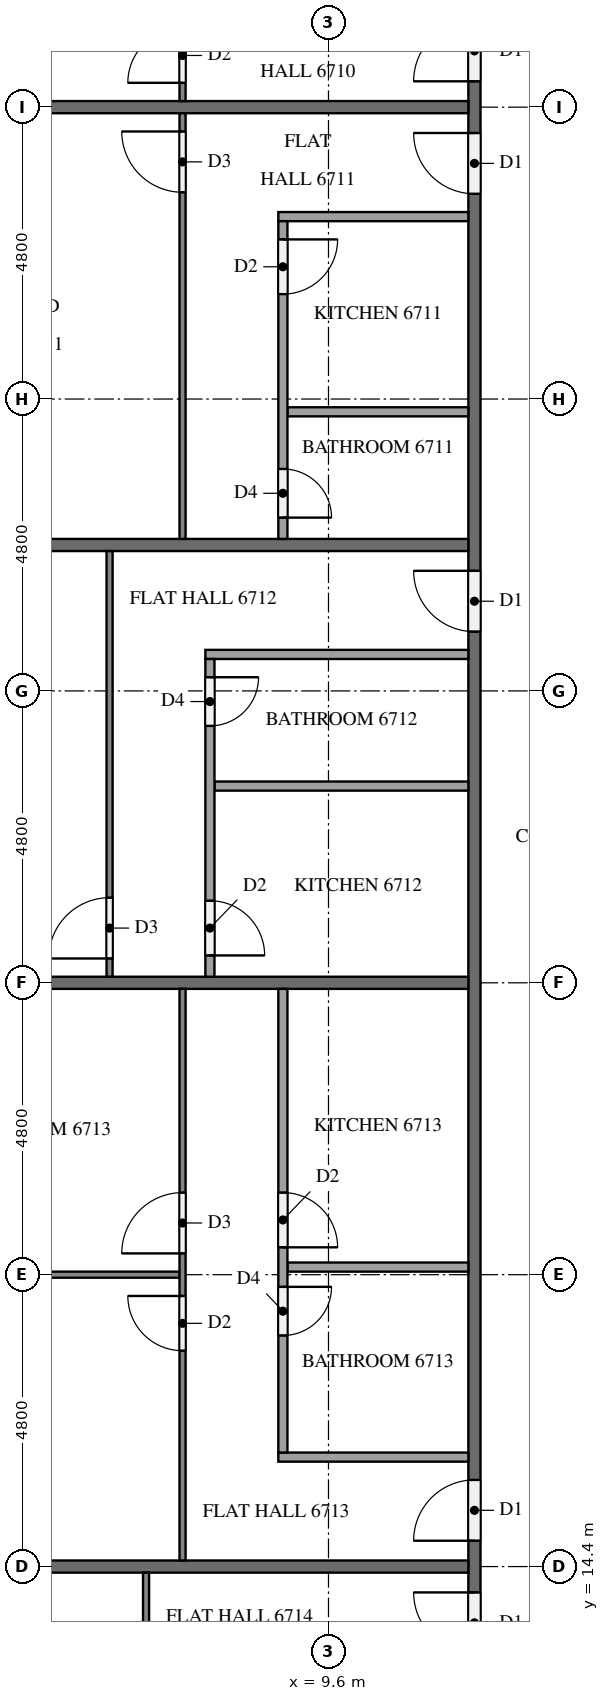
"""IFC4 building model, lengths in metres.
Left out: names, types, materials, properties, quantities, classifications, styles, units other than length and angle.
Written with IfcOpenShell. Run it as: python <this file> out.ifc"""

import sys

from ifc_helpers import new_model, si_unit, direction, frame, frame_2d, origin, place, context, subcontext, project, spatial, rectangle, extrude, element, fill, save


model = new_model("IFC4")
c1 = context("Model", 3, precision=1e-05, world=origin(), true_north=direction((0.0, 1.0)))
c2 = subcontext(c1, "Body", "Model", "MODEL_VIEW")
j1 = project(units=[si_unit("LENGTHUNIT", "METRE"), si_unit("PLANEANGLEUNIT", "RADIAN")], contexts=[c1])
p1 = place(None, origin())
s1 = spatial("IfcSite", under=j1, at=p1, CompositionType="ELEMENT")
p2 = place(p1, origin())
s2 = spatial("IfcBuilding", under=s1, at=p2, CompositionType="ELEMENT")
p3 = place(p2, frame((0.0, 0.0, 256.2)))
s3 = spatial("IfcBuildingStorey", under=s2, at=p3, CompositionType="ELEMENT", Elevation=256.2)
p4 = place(p3, frame((12.0, 12.1, 0.0), z_axis=(0.0, 0.0, 1.0), x_axis=(0.0, 1.0, 0.0)))
e1 = element("IfcWall", 1, at=p4, inside=s3, PredefinedType="PARTITIONING", context=c2, shape_type="SweptSolid", body=[
    extrude(rectangle(XDim=28.6, YDim=0.2, at=frame_2d((14.3, 0.0))), origin(), (0.0, 0.0, 1.0), 3.2),
])
p5 = place(p4, frame((26.725, 0.0, 0.0)))
e2 = element("IfcOpeningElement", 2, at=p5, cuts=e1, PredefinedType="OPENING", context=c2, shape_type="SweptSolid", body=[
    extrude(rectangle(XDim=1.0, YDim=2.1, at=frame_2d((0.5, 1.05))), frame((0.0, 0.11, 0.0), z_axis=(0.0, -1.0, 0.0), x_axis=(1.0, 0.0, 0.0)), (0.0, 0.0, 1.0), 0.22),
])
p6 = place(p4, frame((24.875, 0.0, 0.0)))
e3 = element("IfcOpeningElement", 3, at=p6, cuts=e1, PredefinedType="OPENING", context=c2, shape_type="SweptSolid", body=[
    extrude(rectangle(XDim=1.0, YDim=2.1, at=frame_2d((0.5, 1.05))), frame((0.0, 0.11, 0.0), z_axis=(0.0, -1.0, 0.0), x_axis=(1.0, 0.0, 0.0)), (0.0, 0.0, 1.0), 0.22),
])
p7 = place(p4, frame((17.675, 0.0, 0.0)))
e4 = element("IfcOpeningElement", 4, at=p7, cuts=e1, PredefinedType="OPENING", context=c2, shape_type="SweptSolid", body=[
    extrude(rectangle(XDim=1.0, YDim=2.1, at=frame_2d((0.5, 1.05))), frame((0.0, 0.11, 0.0), z_axis=(0.0, -1.0, 0.0), x_axis=(1.0, 0.0, 0.0)), (0.0, 0.0, 1.0), 0.22),
])
p8 = place(p4, frame((2.725, 0.0, 0.0)))
e5 = element("IfcOpeningElement", 5, at=p8, cuts=e1, PredefinedType="OPENING", context=c2, shape_type="SweptSolid", body=[
    extrude(rectangle(XDim=1.0, YDim=2.1, at=frame_2d((0.5, 1.05))), frame((0.0, 0.11, 0.0), z_axis=(0.0, -1.0, 0.0), x_axis=(1.0, 0.0, 0.0)), (0.0, 0.0, 1.0), 0.22),
])
p9 = place(p4, frame((0.875, 0.0, 0.0)))
e6 = element("IfcOpeningElement", 6, at=p9, cuts=e1, PredefinedType="OPENING", context=c2, shape_type="SweptSolid", body=[
    extrude(rectangle(XDim=1.0, YDim=2.1, at=frame_2d((0.5, 1.05))), frame((0.0, 0.11, 0.0), z_axis=(0.0, -1.0, 0.0), x_axis=(1.0, 0.0, 0.0)), (0.0, 0.0, 1.0), 0.22),
])
p10 = place(p3, frame((0.275, 38.4, 0.0), z_axis=(0.0, 0.0, 1.0), x_axis=(1.0, 0.0, 0.0)))
e7 = element("IfcWall", 7, at=p10, inside=s3, PredefinedType="PARTITIONING", context=c2, shape_type="SweptSolid", body=[
    extrude(rectangle(XDim=11.625, YDim=0.2, at=frame_2d((5.812, 0.0))), origin(), (0.0, 0.0, 1.0), 3.2),
])
for number, where, z_axis, x_axis in (
    (8, (0.1, 31.2, 0.0), (0.0, 0.0, 1.0), (1.0, 0.0, 0.0)),
    (9, (0.1, 24.0, 0.0), (0.0, 0.0, 1.0), (1.0, 0.0, 0.0)),
    (10, (0.1, 14.4, 0.0), (0.0, 0.0, 1.0), (1.0, 0.0, 0.0)),
):
    element("IfcWall", number, at=place(p3, frame(where, z_axis=z_axis, x_axis=x_axis)), inside=s3, PredefinedType="PARTITIONING", context=c2, shape_type="SweptSolid", body=[
        extrude(rectangle(XDim=11.8, YDim=0.2, at=frame_2d((5.9, 0.0))), origin(), (0.0, 0.0, 1.0), 3.2),
    ])
p11 = place(p3, frame((7.2, 38.5, 0.0), z_axis=(0.0, 0.0, 1.0), x_axis=(0.0, 1.0, 0.0)))
e11 = element("IfcWall", 11, at=p11, inside=s3, PredefinedType="PARTITIONING", context=c2, shape_type="SweptSolid", body=[
    extrude(rectangle(XDim=14.2, YDim=0.1, at=frame_2d((7.1, 0.0))), origin(), (0.0, 0.0, 1.0), 3.2),
])
p12 = place(p11, frame((0.3, 0.0, 0.0)))
e12 = element("IfcOpeningElement", 12, at=p12, cuts=e11, PredefinedType="OPENING", context=c2, shape_type="SweptSolid", body=[
    extrude(rectangle(XDim=0.9, YDim=2.1, at=frame_2d((0.45, 1.05))), frame((0.0, 0.06, 0.0), z_axis=(0.0, -1.0, 0.0), x_axis=(1.0, 0.0, 0.0)), (0.0, 0.0, 1.0), 0.12),
])
p13 = place(p11, frame((8.25, 0.0, 0.0)))
e13 = element("IfcOpeningElement", 13, at=p13, cuts=e11, PredefinedType="OPENING", context=c2, shape_type="SweptSolid", body=[
    extrude(rectangle(XDim=0.9, YDim=2.1, at=frame_2d((0.45, 1.05))), frame((0.0, 0.06, 0.0), z_axis=(0.0, -1.0, 0.0), x_axis=(1.0, 0.0, 0.0)), (0.0, 0.0, 1.0), 0.12),
])
p14 = place(p11, frame((9.85, 0.0, 0.0)))
e14 = element("IfcOpeningElement", 14, at=p14, cuts=e11, PredefinedType="OPENING", context=c2, shape_type="SweptSolid", body=[
    extrude(rectangle(XDim=1.0, YDim=2.1, at=frame_2d((0.5, 1.05))), frame((0.0, 0.06, 0.0), z_axis=(0.0, -1.0, 0.0), x_axis=(1.0, 0.0, 0.0)), (0.0, 0.0, 1.0), 0.12),
])
p15 = place(p3, frame((7.2, 31.3, 0.0), z_axis=(0.0, 0.0, 1.0), x_axis=(0.0, 1.0, 0.0)))
e15 = element("IfcWall", 15, at=p15, inside=s3, PredefinedType="PARTITIONING", context=c2, shape_type="SweptSolid", body=[
    extrude(rectangle(XDim=7.0, YDim=0.1, at=frame_2d((3.5, 0.0))), origin(), (0.0, 0.0, 1.0), 3.2),
])
p16 = place(p15, frame((5.7, 0.0, 0.0)))
e16 = element("IfcOpeningElement", 16, at=p16, cuts=e15, PredefinedType="OPENING", context=c2, shape_type="SweptSolid", body=[
    extrude(rectangle(XDim=1.0, YDim=2.1, at=frame_2d((0.5, 1.05))), frame((0.0, 0.06, 0.0), z_axis=(0.0, -1.0, 0.0), x_axis=(1.0, 0.0, 0.0)), (0.0, 0.0, 1.0), 0.12),
])
p17 = place(p3, frame((11.9, 33.39, 0.0), z_axis=(0.0, 0.0, 1.0), x_axis=(-1.0, 0.0, 0.0)))
e17 = element("IfcWall", 17, at=p17, inside=s3, PredefinedType="PARTITIONING", context=c2, shape_type="SweptSolid", body=[
    extrude(rectangle(XDim=2.975, YDim=0.15, at=frame_2d((1.487, 0.0))), origin(), (0.0, 0.0, 1.0), 3.2),
])
p18 = place(p3, frame((11.9, 36.6, 0.0), z_axis=(0.0, 0.0, 1.0), x_axis=(-1.0, 0.0, 0.0)))
e18 = element("IfcWall", 18, at=p18, inside=s3, PredefinedType="PARTITIONING", context=c2, shape_type="SweptSolid", body=[
    extrude(rectangle(XDim=3.125, YDim=0.15, at=frame_2d((1.562, 0.0))), origin(), (0.0, 0.0, 1.0), 3.2),
])
p19 = place(p3, frame((8.85, 36.525, 0.0), z_axis=(0.0, 0.0, 1.0), x_axis=(0.0, -1.0, 0.0)))
e19 = element("IfcWall", 19, at=p19, inside=s3, PredefinedType="PARTITIONING", context=c2, shape_type="SweptSolid", body=[
    extrude(rectangle(XDim=5.225, YDim=0.15, at=frame_2d((2.612, 0.0))), origin(), (0.0, 0.0, 1.0), 3.2),
])
p20 = place(p19, frame((0.3, 0.0, 0.0)))
e20 = element("IfcOpeningElement", 20, at=p20, cuts=e19, PredefinedType="OPENING", context=c2, shape_type="SweptSolid", body=[
    extrude(rectangle(XDim=0.9, YDim=2.1, at=frame_2d((0.45, 1.05))), frame((0.0, 0.085, 0.0), z_axis=(0.0, -1.0, 0.0), x_axis=(1.0, 0.0, 0.0)), (0.0, 0.0, 1.0), 0.17),
])
p21 = place(p19, frame((4.075, 0.0, 0.0)))
e21 = element("IfcOpeningElement", 21, at=p21, cuts=e19, PredefinedType="OPENING", context=c2, shape_type="SweptSolid", body=[
    extrude(rectangle(XDim=0.8, YDim=2.1, at=frame_2d((0.4, 1.05))), frame((0.0, 0.085, 0.0), z_axis=(0.0, -1.0, 0.0), x_axis=(1.0, 0.0, 0.0)), (0.0, 0.0, 1.0), 0.17),
])
p22 = place(p3, frame((6.0, 24.1, 0.0), z_axis=(0.0, 0.0, 1.0), x_axis=(0.0, 1.0, 0.0)))
e22 = element("IfcWall", 22, at=p22, inside=s3, PredefinedType="PARTITIONING", context=c2, shape_type="SweptSolid", body=[
    extrude(rectangle(XDim=7.0, YDim=0.1, at=frame_2d((3.5, 0.0))), origin(), (0.0, 0.0, 1.0), 3.2),
])
p23 = place(p22, frame((0.3, 0.0, 0.0)))
e23 = element("IfcOpeningElement", 23, at=p23, cuts=e22, PredefinedType="OPENING", context=c2, shape_type="SweptSolid", body=[
    extrude(rectangle(XDim=1.0, YDim=2.1, at=frame_2d((0.5, 1.05))), frame((0.0, 0.06, 0.0), z_axis=(0.0, -1.0, 0.0), x_axis=(1.0, 0.0, 0.0)), (0.0, 0.0, 1.0), 0.12),
])
p24 = place(p3, frame((11.9, 27.235, 0.0), z_axis=(0.0, 0.0, 1.0), x_axis=(-1.0, 0.0, 0.0)))
e24 = element("IfcWall", 24, at=p24, inside=s3, PredefinedType="PARTITIONING", context=c2, shape_type="SweptSolid", body=[
    extrude(rectangle(XDim=4.175, YDim=0.15, at=frame_2d((2.087, 0.0))), origin(), (0.0, 0.0, 1.0), 3.2),
])
p25 = place(p3, frame((11.9, 29.4, 0.0), z_axis=(0.0, 0.0, 1.0), x_axis=(-1.0, 0.0, 0.0)))
e25 = element("IfcWall", 25, at=p25, inside=s3, PredefinedType="PARTITIONING", context=c2, shape_type="SweptSolid", body=[
    extrude(rectangle(XDim=4.325, YDim=0.15, at=frame_2d((2.163, 0.0))), origin(), (0.0, 0.0, 1.0), 3.2),
])
p26 = place(p3, frame((7.65, 29.325, 0.0), z_axis=(0.0, 0.0, 1.0), x_axis=(0.0, -1.0, 0.0)))
e26 = element("IfcWall", 26, at=p26, inside=s3, PredefinedType="PARTITIONING", context=c2, shape_type="SweptSolid", body=[
    extrude(rectangle(XDim=5.225, YDim=0.15, at=frame_2d((2.612, 0.0))), origin(), (0.0, 0.0, 1.0), 3.2),
])
p27 = place(p26, frame((0.3, 0.0, 0.0)))
e27 = element("IfcOpeningElement", 27, at=p27, cuts=e26, PredefinedType="OPENING", context=c2, shape_type="SweptSolid", body=[
    extrude(rectangle(XDim=0.8, YDim=2.1, at=frame_2d((0.4, 1.05))), frame((0.0, 0.085, 0.0), z_axis=(0.0, -1.0, 0.0), x_axis=(1.0, 0.0, 0.0)), (0.0, 0.0, 1.0), 0.17),
])
p28 = place(p26, frame((3.975, 0.0, 0.0)))
e28 = element("IfcOpeningElement", 28, at=p28, cuts=e26, PredefinedType="OPENING", context=c2, shape_type="SweptSolid", body=[
    extrude(rectangle(XDim=0.9, YDim=2.1, at=frame_2d((0.45, 1.05))), frame((0.0, 0.085, 0.0), z_axis=(0.0, -1.0, 0.0), x_axis=(1.0, 0.0, 0.0)), (0.0, 0.0, 1.0), 0.17),
])
p29 = place(p3, frame((7.15, 19.2, 0.0), z_axis=(0.0, 0.0, 1.0), x_axis=(-1.0, 0.0, 0.0)))
e29 = element("IfcWall", 29, at=p29, inside=s3, PredefinedType="PARTITIONING", context=c2, shape_type="SweptSolid", body=[
    extrude(rectangle(XDim=6.875, YDim=0.1, at=frame_2d((3.438, 0.0))), origin(), (0.0, 0.0, 1.0), 3.2),
])
p30 = place(p3, frame((7.2, 14.5, 0.0), z_axis=(0.0, 0.0, 1.0), x_axis=(0.0, 1.0, 0.0)))
e30 = element("IfcWall", 30, at=p30, inside=s3, PredefinedType="PARTITIONING", context=c2, shape_type="SweptSolid", body=[
    extrude(rectangle(XDim=9.4, YDim=0.1, at=frame_2d((4.7, 0.0))), origin(), (0.0, 0.0, 1.0), 3.2),
])
p31 = place(p30, frame((3.45, 0.0, 0.0)))
e31 = element("IfcOpeningElement", 31, at=p31, cuts=e30, PredefinedType="OPENING", context=c2, shape_type="SweptSolid", body=[
    extrude(rectangle(XDim=0.9, YDim=2.1, at=frame_2d((0.45, 1.05))), frame((0.0, 0.06, 0.0), z_axis=(0.0, -1.0, 0.0), x_axis=(1.0, 0.0, 0.0)), (0.0, 0.0, 1.0), 0.12),
])
p32 = place(p30, frame((5.05, 0.0, 0.0)))
e32 = element("IfcOpeningElement", 32, at=p32, cuts=e30, PredefinedType="OPENING", context=c2, shape_type="SweptSolid", body=[
    extrude(rectangle(XDim=1.0, YDim=2.1, at=frame_2d((0.5, 1.05))), frame((0.0, 0.06, 0.0), z_axis=(0.0, -1.0, 0.0), x_axis=(1.0, 0.0, 0.0)), (0.0, 0.0, 1.0), 0.12),
])
p33 = place(p3, frame((11.9, 19.325, 0.0), z_axis=(0.0, 0.0, 1.0), x_axis=(-1.0, 0.0, 0.0)))
e33 = element("IfcWall", 33, at=p33, inside=s3, PredefinedType="PARTITIONING", context=c2, shape_type="SweptSolid", body=[
    extrude(rectangle(XDim=2.975, YDim=0.15, at=frame_2d((1.487, 0.0))), origin(), (0.0, 0.0, 1.0), 3.2),
])
p34 = place(p3, frame((11.9, 16.2, 0.0), z_axis=(0.0, 0.0, 1.0), x_axis=(-1.0, 0.0, 0.0)))
e34 = element("IfcWall", 34, at=p34, inside=s3, PredefinedType="PARTITIONING", context=c2, shape_type="SweptSolid", body=[
    extrude(rectangle(XDim=3.125, YDim=0.15, at=frame_2d((1.562, 0.0))), origin(), (0.0, 0.0, 1.0), 3.2),
])
p35 = place(p3, frame((8.85, 23.9, 0.0), z_axis=(0.0, 0.0, 1.0), x_axis=(0.0, -1.0, 0.0)))
e35 = element("IfcWall", 35, at=p35, inside=s3, PredefinedType="PARTITIONING", context=c2, shape_type="SweptSolid", body=[
    extrude(rectangle(XDim=7.625, YDim=0.15, at=frame_2d((3.812, 0.0))), origin(), (0.0, 0.0, 1.0), 3.2),
])
p36 = place(p35, frame((4.9, 0.0, 0.0)))
e36 = element("IfcOpeningElement", 36, at=p36, cuts=e35, PredefinedType="OPENING", context=c2, shape_type="SweptSolid", body=[
    extrude(rectangle(XDim=0.8, YDim=2.1, at=frame_2d((0.4, 1.05))), frame((0.0, 0.085, 0.0), z_axis=(0.0, -1.0, 0.0), x_axis=(1.0, 0.0, 0.0)), (0.0, 0.0, 1.0), 0.17),
])
p37 = place(p35, frame((3.35, 0.0, 0.0)))
e37 = element("IfcOpeningElement", 37, at=p37, cuts=e35, PredefinedType="OPENING", context=c2, shape_type="SweptSolid", body=[
    extrude(rectangle(XDim=0.9, YDim=2.1, at=frame_2d((0.45, 1.05))), frame((0.0, 0.085, 0.0), z_axis=(0.0, -1.0, 0.0), x_axis=(1.0, 0.0, 0.0)), (0.0, 0.0, 1.0), 0.17),
])
p38 = place(p3, frame((6.6, 4.9, 0.0), z_axis=(0.0, 0.0, 1.0), x_axis=(0.0, 1.0, 0.0)))
e38 = element("IfcWall", 38, at=p38, inside=s3, PredefinedType="PARTITIONING", context=c2, shape_type="SweptSolid", body=[
    extrude(rectangle(XDim=9.4, YDim=0.1, at=frame_2d((4.7, 0.0))), origin(), (0.0, 0.0, 1.0), 3.2),
])
p39 = place(p38, frame((5.05, 0.0, 0.0)))
e39 = element("IfcOpeningElement", 39, at=p39, cuts=e38, PredefinedType="OPENING", context=c2, shape_type="SweptSolid", body=[
    extrude(rectangle(XDim=0.9, YDim=2.1, at=frame_2d((0.45, 1.05))), frame((0.0, 0.06, 0.0), z_axis=(0.0, -1.0, 0.0), x_axis=(1.0, 0.0, 0.0)), (0.0, 0.0, 1.0), 0.12),
])
p40 = place(p38, frame((3.35, 0.0, 0.0)))
e40 = element("IfcOpeningElement", 40, at=p40, cuts=e38, PredefinedType="OPENING", context=c2, shape_type="SweptSolid", body=[
    extrude(rectangle(XDim=1.0, YDim=2.1, at=frame_2d((0.5, 1.05))), frame((0.0, 0.06, 0.0), z_axis=(0.0, -1.0, 0.0), x_axis=(1.0, 0.0, 0.0)), (0.0, 0.0, 1.0), 0.12),
])
p41 = place(p5, origin())
e41 = element("IfcDoor", 41, at=p41, inside=s3, OperationType="SINGLE_SWING_LEFT", PredefinedType="DOOR", context=c2, shape_type="SweptSolid", body=[
    extrude(rectangle(XDim=1.0, YDim=2.1, at=frame_2d((0.5, 1.05))), frame((0.0, 0.025, 0.0), z_axis=(0.0, -1.0, 0.0), x_axis=(1.0, 0.0, 0.0)), (0.0, 0.0, 1.0), 0.05),
])
fill(e2, e41)
p42 = place(p6, origin())
e42 = element("IfcDoor", 42, at=p42, inside=s3, OperationType="SINGLE_SWING_RIGHT", PredefinedType="DOOR", context=c2, shape_type="SweptSolid", body=[
    extrude(rectangle(XDim=1.0, YDim=2.1, at=frame_2d((0.5, 1.05))), frame((0.0, 0.025, 0.0), z_axis=(0.0, -1.0, 0.0), x_axis=(1.0, 0.0, 0.0)), (0.0, 0.0, 1.0), 0.05),
])
fill(e3, e42)
p43 = place(p7, origin())
e43 = element("IfcDoor", 43, at=p43, inside=s3, OperationType="SINGLE_SWING_RIGHT", PredefinedType="DOOR", context=c2, shape_type="SweptSolid", body=[
    extrude(rectangle(XDim=1.0, YDim=2.1, at=frame_2d((0.5, 1.05))), frame((0.0, 0.025, 0.0), z_axis=(0.0, -1.0, 0.0), x_axis=(1.0, 0.0, 0.0)), (0.0, 0.0, 1.0), 0.05),
])
fill(e4, e43)
p44 = place(p8, origin())
e44 = element("IfcDoor", 44, at=p44, inside=s3, OperationType="SINGLE_SWING_LEFT", PredefinedType="DOOR", context=c2, shape_type="SweptSolid", body=[
    extrude(rectangle(XDim=1.0, YDim=2.1, at=frame_2d((0.5, 1.05))), frame((0.0, 0.025, 0.0), z_axis=(0.0, -1.0, 0.0), x_axis=(1.0, 0.0, 0.0)), (0.0, 0.0, 1.0), 0.05),
])
fill(e5, e44)
p45 = place(p9, origin())
e45 = element("IfcDoor", 45, at=p45, inside=s3, OperationType="SINGLE_SWING_RIGHT", PredefinedType="DOOR", context=c2, shape_type="SweptSolid", body=[
    extrude(rectangle(XDim=1.0, YDim=2.1, at=frame_2d((0.5, 1.05))), frame((0.0, 0.025, 0.0), z_axis=(0.0, -1.0, 0.0), x_axis=(1.0, 0.0, 0.0)), (0.0, 0.0, 1.0), 0.05),
])
fill(e6, e45)
p46 = place(p12, origin())
e46 = element("IfcDoor", 46, at=p46, inside=s3, OperationType="SINGLE_SWING_LEFT", PredefinedType="DOOR", context=c2, shape_type="SweptSolid", body=[
    extrude(rectangle(XDim=0.9, YDim=2.1, at=frame_2d((0.45, 1.05))), frame((0.0, 0.025, 0.0), z_axis=(0.0, -1.0, 0.0), x_axis=(1.0, 0.0, 0.0)), (0.0, 0.0, 1.0), 0.05),
])
fill(e12, e46)
p47 = place(p16, origin())
e47 = element("IfcDoor", 47, at=p47, inside=s3, OperationType="SINGLE_SWING_RIGHT", PredefinedType="DOOR", context=c2, shape_type="SweptSolid", body=[
    extrude(rectangle(XDim=1.0, YDim=2.1, at=frame_2d((0.5, 1.05))), frame((0.0, 0.025, 0.0), z_axis=(0.0, -1.0, 0.0), x_axis=(1.0, 0.0, 0.0)), (0.0, 0.0, 1.0), 0.05),
])
fill(e16, e47)
p48 = place(p20, origin())
e48 = element("IfcDoor", 48, at=p48, inside=s3, OperationType="SINGLE_SWING_LEFT", PredefinedType="DOOR", context=c2, shape_type="SweptSolid", body=[
    extrude(rectangle(XDim=0.9, YDim=2.1, at=frame_2d((0.45, 1.05))), frame((0.0, 0.025, 0.0), z_axis=(0.0, -1.0, 0.0), x_axis=(1.0, 0.0, 0.0)), (0.0, 0.0, 1.0), 0.05),
])
fill(e20, e48)
p49 = place(p21, origin())
e49 = element("IfcDoor", 49, at=p49, inside=s3, OperationType="SINGLE_SWING_RIGHT", PredefinedType="DOOR", context=c2, shape_type="SweptSolid", body=[
    extrude(rectangle(XDim=0.8, YDim=2.1, at=frame_2d((0.4, 1.05))), frame((0.0, 0.025, 0.0), z_axis=(0.0, -1.0, 0.0), x_axis=(1.0, 0.0, 0.0)), (0.0, 0.0, 1.0), 0.05),
])
fill(e21, e49)
p50 = place(p23, origin())
e50 = element("IfcDoor", 50, at=p50, inside=s3, OperationType="SINGLE_SWING_LEFT", PredefinedType="DOOR", context=c2, shape_type="SweptSolid", body=[
    extrude(rectangle(XDim=1.0, YDim=2.1, at=frame_2d((0.5, 1.05))), frame((0.0, 0.025, 0.0), z_axis=(0.0, -1.0, 0.0), x_axis=(1.0, 0.0, 0.0)), (0.0, 0.0, 1.0), 0.05),
])
fill(e23, e50)
p51 = place(p27, origin())
e51 = element("IfcDoor", 51, at=p51, inside=s3, OperationType="SINGLE_SWING_LEFT", PredefinedType="DOOR", context=c2, shape_type="SweptSolid", body=[
    extrude(rectangle(XDim=0.8, YDim=2.1, at=frame_2d((0.4, 1.05))), frame((0.0, 0.025, 0.0), z_axis=(0.0, -1.0, 0.0), x_axis=(1.0, 0.0, 0.0)), (0.0, 0.0, 1.0), 0.05),
])
fill(e27, e51)
p52 = place(p28, origin())
e52 = element("IfcDoor", 52, at=p52, inside=s3, OperationType="SINGLE_SWING_RIGHT", PredefinedType="DOOR", context=c2, shape_type="SweptSolid", body=[
    extrude(rectangle(XDim=0.9, YDim=2.1, at=frame_2d((0.45, 1.05))), frame((0.0, 0.025, 0.0), z_axis=(0.0, -1.0, 0.0), x_axis=(1.0, 0.0, 0.0)), (0.0, 0.0, 1.0), 0.05),
])
fill(e28, e52)
p53 = place(p31, origin())
e53 = element("IfcDoor", 53, at=p53, inside=s3, OperationType="SINGLE_SWING_RIGHT", PredefinedType="DOOR", context=c2, shape_type="SweptSolid", body=[
    extrude(rectangle(XDim=0.9, YDim=2.1, at=frame_2d((0.45, 1.05))), frame((0.0, 0.025, 0.0), z_axis=(0.0, -1.0, 0.0), x_axis=(1.0, 0.0, 0.0)), (0.0, 0.0, 1.0), 0.05),
])
fill(e31, e53)
p54 = place(p32, origin())
e54 = element("IfcDoor", 54, at=p54, inside=s3, OperationType="SINGLE_SWING_LEFT", PredefinedType="DOOR", context=c2, shape_type="SweptSolid", body=[
    extrude(rectangle(XDim=1.0, YDim=2.1, at=frame_2d((0.5, 1.05))), frame((0.0, 0.025, 0.0), z_axis=(0.0, -1.0, 0.0), x_axis=(1.0, 0.0, 0.0)), (0.0, 0.0, 1.0), 0.05),
])
fill(e32, e54)
p55 = place(p36, origin())
e55 = element("IfcDoor", 55, at=p55, inside=s3, OperationType="SINGLE_SWING_LEFT", PredefinedType="DOOR", context=c2, shape_type="SweptSolid", body=[
    extrude(rectangle(XDim=0.8, YDim=2.1, at=frame_2d((0.4, 1.05))), frame((0.0, 0.025, 0.0), z_axis=(0.0, -1.0, 0.0), x_axis=(1.0, 0.0, 0.0)), (0.0, 0.0, 1.0), 0.05),
])
fill(e36, e55)
p56 = place(p37, origin())
e56 = element("IfcDoor", 56, at=p56, inside=s3, OperationType="SINGLE_SWING_RIGHT", PredefinedType="DOOR", context=c2, shape_type="SweptSolid", body=[
    extrude(rectangle(XDim=0.9, YDim=2.1, at=frame_2d((0.45, 1.05))), frame((0.0, 0.025, 0.0), z_axis=(0.0, -1.0, 0.0), x_axis=(1.0, 0.0, 0.0)), (0.0, 0.0, 1.0), 0.05),
])
fill(e37, e56)
save(model, sys.argv[1])
